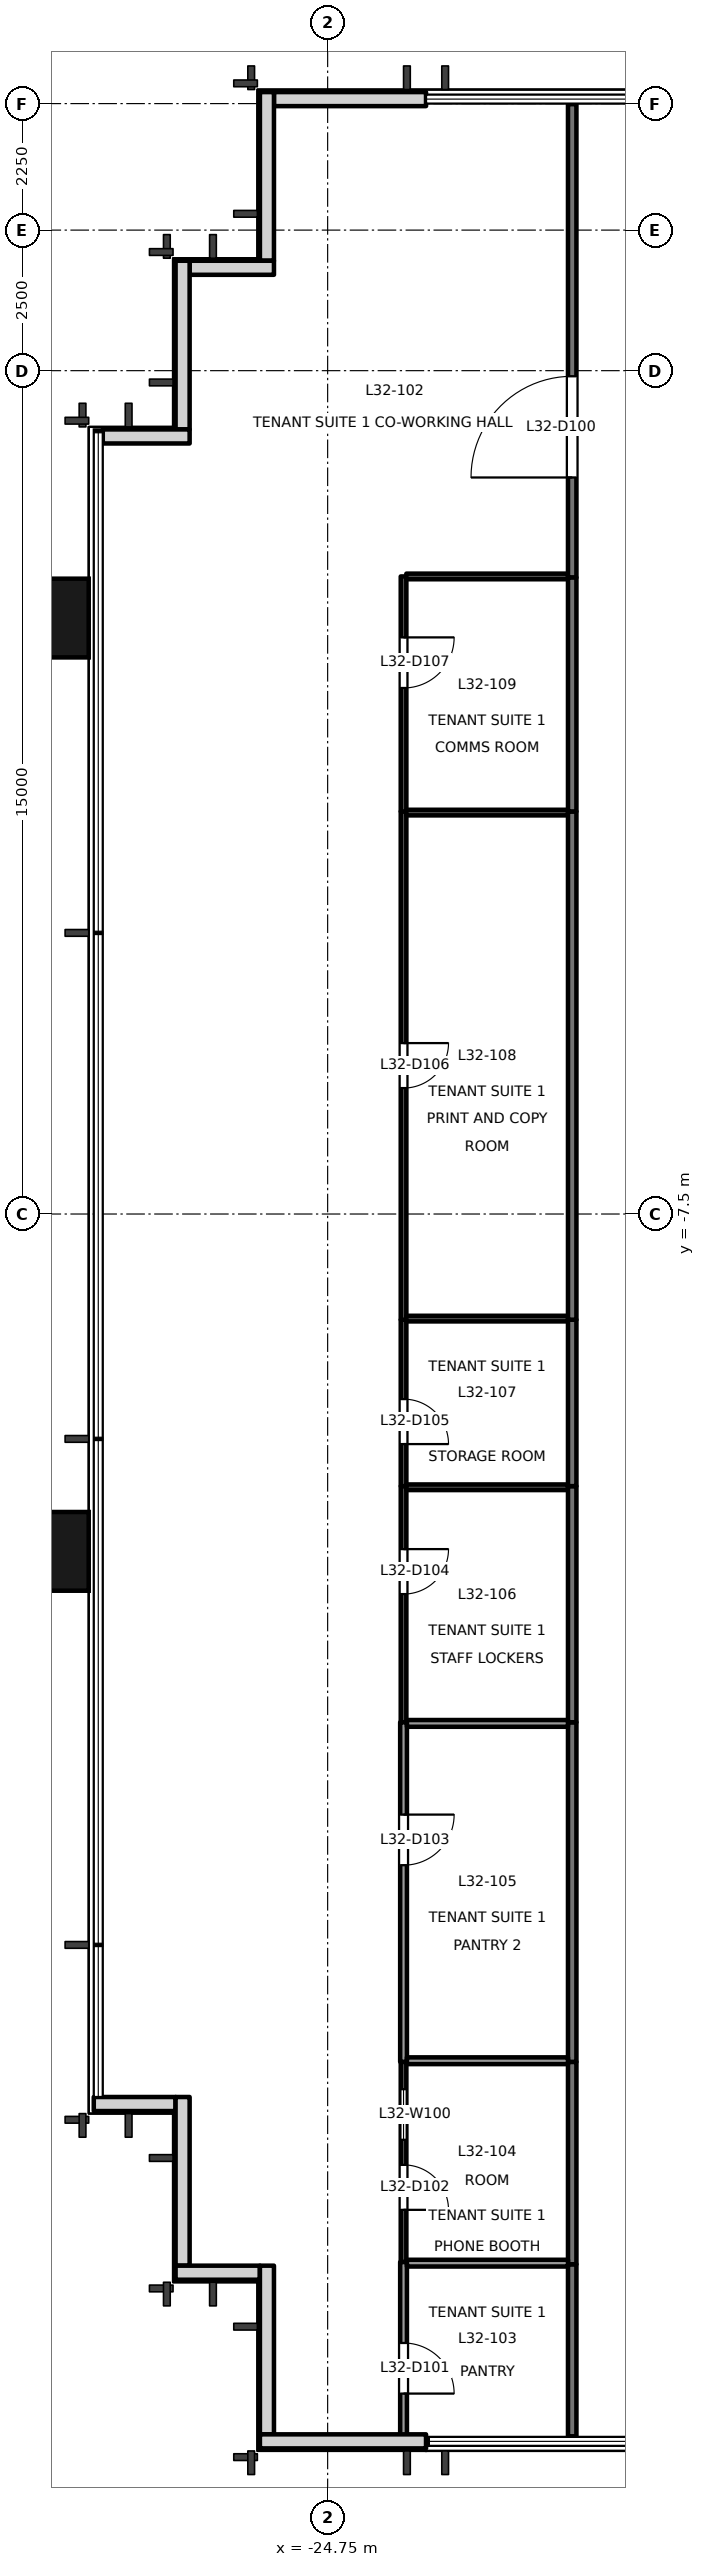
"""IFC4 building model, lengths in metres.
Left out: names, types, materials, properties, quantities, classifications, styles, units other than length and angle.
Written with IfcOpenShell. Run it as: python <this file> out.ifc"""

import sys

from ifc_helpers import new_model, si_unit, direction, frame, frame_2d, origin, origin_2d, place, context, subcontext, project, spatial, rectangle, extrude, element, fill, save


model = new_model("IFC4")
c1 = context("Model", 3, precision=1e-05, world=origin(), true_north=direction((0.0, 1.0)))
c2 = subcontext(c1, "Body", "Model", "MODEL_VIEW")
j1 = project(units=[si_unit("LENGTHUNIT", "METRE"), si_unit("PLANEANGLEUNIT", "RADIAN")], contexts=[c1])
p1 = place(None, origin())
s1 = spatial("IfcSite", under=j1, at=p1, CompositionType="ELEMENT")
p2 = place(p1, origin())
s2 = spatial("IfcBuilding", under=s1, at=p2, CompositionType="ELEMENT")
p3 = place(p2, frame((0.0, 0.0, 142.1)))
s3 = spatial("IfcBuildingStorey", under=s2, at=p3, CompositionType="ELEMENT", Elevation=142.1)
for number, where, z_axis, x_axis in (
    (1, (-29.9, -13.5, -0.2), (0.0, 0.0, 1.0), (0.0, 1.0, 0.0)),
    (2, (-29.9, 3.1, -0.2), (0.0, 0.0, 1.0), (0.0, 1.0, 0.0)),
):
    element("IfcColumn", number, at=place(p3, frame(where, z_axis=z_axis, x_axis=x_axis)), inside=s3, PredefinedType="COLUMN", context=c2, shape_type="SweptSolid", body=[
        extrude(rectangle(XDim=1.4, YDim=1.8, at=origin_2d()), origin(), (0.0, 0.0, 1.0), 4.0),
    ])
p4 = place(p3, frame((-23.0, 12.33, 0.0), z_axis=(0.0, 0.0, 1.0), x_axis=(-1.0, 0.0, 0.0)))
e3 = element("IfcWall", 3, at=p4, inside=s3, PredefinedType="SOLIDWALL", context=c2, shape_type="SweptSolid", body=[
    extrude(rectangle(XDim=2.705, YDim=0.25, at=frame_2d((1.353, 0.0))), origin(), (0.0, 0.0, 1.0), 3.8),
])
p5 = place(p3, frame((-25.83, 12.455, 0.0), z_axis=(0.0, 0.0, 1.0), x_axis=(0.0, -1.0, 0.0)))
e4 = element("IfcWall", 4, at=p5, inside=s3, PredefinedType="SOLIDWALL", context=c2, shape_type="SweptSolid", body=[
    extrude(rectangle(XDim=3.0, YDim=0.25, at=frame_2d((1.5, 0.0))), origin(), (0.0, 0.0, 1.0), 3.8),
])
p6 = place(p3, frame((-25.705, 9.33, 0.0), z_axis=(0.0, 0.0, 1.0), x_axis=(-1.0, 0.0, 0.0)))
e5 = element("IfcWall", 5, at=p6, inside=s3, PredefinedType="SOLIDWALL", context=c2, shape_type="SweptSolid", body=[
    extrude(rectangle(XDim=1.5, YDim=0.25, at=frame_2d((0.75, 0.0))), origin(), (0.0, 0.0, 1.0), 3.8),
])
p7 = place(p3, frame((-27.33, 9.455, 0.0), z_axis=(0.0, 0.0, 1.0), x_axis=(0.0, -1.0, 0.0)))
e6 = element("IfcWall", 6, at=p7, inside=s3, PredefinedType="SOLIDWALL", context=c2, shape_type="SweptSolid", body=[
    extrude(rectangle(XDim=3.0, YDim=0.25, at=frame_2d((1.5, 0.0))), origin(), (0.0, 0.0, 1.0), 3.8),
])
p8 = place(p3, frame((-27.205, 6.33, 0.0), z_axis=(0.0, 0.0, 1.0), x_axis=(-1.0, 0.0, 0.0)))
e7 = element("IfcWall", 7, at=p8, inside=s3, PredefinedType="SOLIDWALL", context=c2, shape_type="SweptSolid", body=[
    extrude(rectangle(XDim=1.545, YDim=0.25, at=frame_2d((0.772, 0.0))), origin(), (0.0, 0.0, 1.0), 3.8),
])
p9 = place(p3, frame((-28.91, -23.33, 0.0), z_axis=(0.0, 0.0, 1.0), x_axis=(1.0, 0.0, 0.0)))
e8 = element("IfcWall", 8, at=p9, inside=s3, PredefinedType="SOLIDWALL", context=c2, shape_type="SweptSolid", body=[
    extrude(rectangle(XDim=1.455, YDim=0.25, at=frame_2d((0.728, 0.0))), origin(), (0.0, 0.0, 1.0), 3.8),
])
p10 = place(p3, frame((-27.33, -23.205, 0.0), z_axis=(0.0, 0.0, 1.0), x_axis=(0.0, -1.0, 0.0)))
e9 = element("IfcWall", 9, at=p10, inside=s3, PredefinedType="SOLIDWALL", context=c2, shape_type="SweptSolid", body=[
    extrude(rectangle(XDim=3.0, YDim=0.25, at=frame_2d((1.5, 0.0))), origin(), (0.0, 0.0, 1.0), 3.8),
])
p11 = place(p3, frame((-27.455, -26.33, 0.0), z_axis=(0.0, 0.0, 1.0), x_axis=(1.0, 0.0, 0.0)))
e10 = element("IfcWall", 10, at=p11, inside=s3, PredefinedType="SOLIDWALL", context=c2, shape_type="SweptSolid", body=[
    extrude(rectangle(XDim=1.5, YDim=0.25, at=frame_2d((0.75, 0.0))), origin(), (0.0, 0.0, 1.0), 3.8),
])
p12 = place(p3, frame((-25.83, -26.205, 0.0), z_axis=(0.0, 0.0, 1.0), x_axis=(0.0, -1.0, 0.0)))
e11 = element("IfcWall", 11, at=p12, inside=s3, PredefinedType="SOLIDWALL", context=c2, shape_type="SweptSolid", body=[
    extrude(rectangle(XDim=3.0, YDim=0.25, at=frame_2d((1.5, 0.0))), origin(), (0.0, 0.0, 1.0), 3.8),
])
p13 = place(p3, frame((-25.955, -29.33, 0.0), z_axis=(0.0, 0.0, 1.0), x_axis=(1.0, 0.0, 0.0)))
e12 = element("IfcWall", 12, at=p13, inside=s3, PredefinedType="SOLIDWALL", context=c2, shape_type="SweptSolid", body=[
    extrude(rectangle(XDim=2.955, YDim=0.25, at=frame_2d((1.478, 0.0))), origin(), (0.0, 0.0, 1.0), 3.8),
])
p14 = place(p3, frame((-20.4, 3.82, 0.0), z_axis=(0.0, 0.0, 1.0), x_axis=(0.0, 1.0, 0.0)))
e13 = element("IfcWall", 13, at=p14, inside=s3, PredefinedType="PARTITIONING", context=c2, shape_type="SweptSolid", body=[
    extrude(rectangle(XDim=8.42, YDim=0.15, at=frame_2d((4.21, 0.0))), origin(), (0.0, 0.0, 1.0), 3.3),
])
p15 = place(p14, frame((1.78, 0.0, 0.0)))
e14 = element("IfcOpeningElement", 14, at=p15, cuts=e13, PredefinedType="OPENING", context=c2, shape_type="SweptSolid", body=[
    extrude(rectangle(XDim=1.8, YDim=2.1, at=frame_2d((0.9, 1.05))), frame((0.0, 0.085, 0.0), z_axis=(0.0, -1.0, 0.0), x_axis=(1.0, 0.0, 0.0)), (0.0, 0.0, 1.0), 0.171),
])
p16 = place(p3, frame((-20.4, -29.24, 0.0), z_axis=(0.0, 0.0, 1.0), x_axis=(0.0, 1.0, 0.0)))
e15 = element("IfcWall", 15, at=p16, inside=s3, PredefinedType="PARTITIONING", context=c2, shape_type="SweptSolid", body=[
    extrude(rectangle(XDim=3.06, YDim=0.15, at=frame_2d((1.53, 0.0))), origin(), (0.0, 0.0, 1.0), 3.8),
])
p17 = place(p3, frame((-20.4, -26.18, 0.0), z_axis=(0.0, 0.0, 1.0), x_axis=(0.0, 1.0, 0.0)))
e16 = element("IfcWall", 16, at=p17, inside=s3, PredefinedType="PARTITIONING", context=c2, shape_type="SweptSolid", body=[
    extrude(rectangle(XDim=3.6, YDim=0.15, at=frame_2d((1.8, 0.0))), origin(), (0.0, 0.0, 1.0), 3.8),
])
p18 = place(p3, frame((-20.4, -22.58, 0.0), z_axis=(0.0, 0.0, 1.0), x_axis=(0.0, 1.0, 0.0)))
e17 = element("IfcWall", 17, at=p18, inside=s3, PredefinedType="PARTITIONING", context=c2, shape_type="SweptSolid", body=[
    extrude(rectangle(XDim=6.04, YDim=0.15, at=frame_2d((3.02, 0.0))), origin(), (0.0, 0.0, 1.0), 3.8),
])
p19 = place(p3, frame((-20.4, -16.54, 0.0), z_axis=(0.0, 0.0, 1.0), x_axis=(0.0, 1.0, 0.0)))
e18 = element("IfcWall", 18, at=p19, inside=s3, PredefinedType="PARTITIONING", context=c2, shape_type="SweptSolid", body=[
    extrude(rectangle(XDim=4.2, YDim=0.15, at=frame_2d((2.1, 0.0))), origin(), (0.0, 0.0, 1.0), 3.8),
])
p20 = place(p3, frame((-20.4, -12.34, 0.0), z_axis=(0.0, 0.0, 1.0), x_axis=(0.0, 1.0, 0.0)))
e19 = element("IfcWall", 19, at=p20, inside=s3, PredefinedType="PARTITIONING", context=c2, shape_type="SweptSolid", body=[
    extrude(rectangle(XDim=2.96, YDim=0.15, at=frame_2d((1.48, 0.0))), origin(), (0.0, 0.0, 1.0), 3.8),
])
p21 = place(p3, frame((-20.4, -9.38, 0.0), z_axis=(0.0, 0.0, 1.0), x_axis=(0.0, 1.0, 0.0)))
e20 = element("IfcWall", 20, at=p21, inside=s3, PredefinedType="PARTITIONING", context=c2, shape_type="SweptSolid", body=[
    extrude(rectangle(XDim=9.04, YDim=0.15, at=frame_2d((4.52, 0.0))), origin(), (0.0, 0.0, 1.0), 3.3),
])
p22 = place(p3, frame((-20.4, -0.34, 0.0), z_axis=(0.0, 0.0, 1.0), x_axis=(0.0, 1.0, 0.0)))
e21 = element("IfcWall", 21, at=p22, inside=s3, PredefinedType="PARTITIONING", context=c2, shape_type="SweptSolid", body=[
    extrude(rectangle(XDim=4.16, YDim=0.15, at=frame_2d((2.08, 0.0))), origin(), (0.0, 0.0, 1.0), 3.3),
])
p23 = place(p3, frame((-23.4, -26.14, 0.0), z_axis=(0.0, 0.0, 1.0), x_axis=(0.0, -1.0, 0.0)))
e22 = element("IfcWall", 22, at=p23, inside=s3, PredefinedType="PARTITIONING", context=c2, shape_type="SweptSolid", body=[
    extrude(rectangle(XDim=3.1, YDim=0.12, at=frame_2d((1.55, 0.0))), origin(), (0.0, 0.0, 1.0), 3.8),
])
p24 = place(p23, frame((1.44, 0.0, 0.0)))
e23 = element("IfcOpeningElement", 23, at=p24, cuts=e22, PredefinedType="OPENING", context=c2, shape_type="SweptSolid", body=[
    extrude(rectangle(XDim=0.9, YDim=2.1, at=frame_2d((0.45, 1.05))), frame((0.0, 0.071, 0.0), z_axis=(0.0, -1.0, 0.0), x_axis=(1.0, 0.0, 0.0)), (0.0, 0.0, 1.0), 0.141),
])
p25 = place(p3, frame((-23.4, -22.58, 0.0), z_axis=(0.0, 0.0, 1.0), x_axis=(0.0, -1.0, 0.0)))
e24 = element("IfcWall", 24, at=p25, inside=s3, PredefinedType="PARTITIONING", context=c2, shape_type="SweptSolid", body=[
    extrude(rectangle(XDim=3.56, YDim=0.1, at=frame_2d((1.78, 0.0))), origin(), (0.0, 0.0, 1.0), 3.8),
])
p26 = place(p25, frame((1.832, 0.0, 0.0)))
e25 = element("IfcOpeningElement", 25, at=p26, cuts=e24, PredefinedType="OPENING", context=c2, shape_type="SweptSolid", body=[
    extrude(rectangle(XDim=0.8, YDim=2.1, at=frame_2d((0.4, 1.05))), frame((0.0, 0.061, 0.0), z_axis=(0.0, -1.0, 0.0), x_axis=(1.0, 0.0, 0.0)), (0.0, 0.0, 1.0), 0.121),
])
p27 = place(p25, frame((0.486, 0.0, 0.9)))
e26 = element("IfcOpeningElement", 26, at=p27, cuts=e24, PredefinedType="OPENING", context=c2, shape_type="SweptSolid", body=[
    extrude(rectangle(XDim=0.9, YDim=1.2, at=frame_2d((0.45, 0.6))), frame((0.0, 0.061, 0.0), z_axis=(0.0, -1.0, 0.0), x_axis=(1.0, 0.0, 0.0)), (0.0, 0.0, 1.0), 0.121),
])
p28 = place(p3, frame((-23.4, -16.54, 0.0), z_axis=(0.0, 0.0, 1.0), x_axis=(0.0, -1.0, 0.0)))
e27 = element("IfcWall", 27, at=p28, inside=s3, PredefinedType="PARTITIONING", context=c2, shape_type="SweptSolid", body=[
    extrude(rectangle(XDim=6.04, YDim=0.12, at=frame_2d((3.02, 0.0))), origin(), (0.0, 0.0, 1.0), 3.8),
])
p29 = place(p28, frame((1.642, 0.0, 0.0)))
e28 = element("IfcOpeningElement", 28, at=p29, cuts=e27, PredefinedType="OPENING", context=c2, shape_type="SweptSolid", body=[
    extrude(rectangle(XDim=0.9, YDim=2.1, at=frame_2d((0.45, 1.05))), frame((0.0, 0.071, 0.0), z_axis=(0.0, -1.0, 0.0), x_axis=(1.0, 0.0, 0.0)), (0.0, 0.0, 1.0), 0.141),
])
p30 = place(p3, frame((-23.4, -12.34, 0.0), z_axis=(0.0, 0.0, 1.0), x_axis=(0.0, -1.0, 0.0)))
e29 = element("IfcWall", 29, at=p30, inside=s3, PredefinedType="PARTITIONING", context=c2, shape_type="SweptSolid", body=[
    extrude(rectangle(XDim=4.2, YDim=0.1, at=frame_2d((2.1, 0.0))), origin(), (0.0, 0.0, 1.0), 3.8),
])
p31 = place(p30, frame((1.12, 0.0, 0.0)))
e30 = element("IfcOpeningElement", 30, at=p31, cuts=e29, PredefinedType="OPENING", context=c2, shape_type="SweptSolid", body=[
    extrude(rectangle(XDim=0.8, YDim=2.1, at=frame_2d((0.4, 1.05))), frame((0.0, 0.061, 0.0), z_axis=(0.0, -1.0, 0.0), x_axis=(1.0, 0.0, 0.0)), (0.0, 0.0, 1.0), 0.121),
])
p32 = place(p3, frame((-23.4, -9.38, 0.0), z_axis=(0.0, 0.0, 1.0), x_axis=(0.0, -1.0, 0.0)))
e31 = element("IfcWall", 31, at=p32, inside=s3, PredefinedType="PARTITIONING", context=c2, shape_type="SweptSolid", body=[
    extrude(rectangle(XDim=2.96, YDim=0.1, at=frame_2d((1.48, 0.0))), origin(), (0.0, 0.0, 1.0), 3.8),
])
p33 = place(p32, frame((1.412, 0.0, 0.0)))
e32 = element("IfcOpeningElement", 32, at=p33, cuts=e31, PredefinedType="OPENING", context=c2, shape_type="SweptSolid", body=[
    extrude(rectangle(XDim=0.8, YDim=2.1, at=frame_2d((0.4, 1.05))), frame((0.0, 0.061, 0.0), z_axis=(0.0, -1.0, 0.0), x_axis=(1.0, 0.0, 0.0)), (0.0, 0.0, 1.0), 0.121),
])
p34 = place(p3, frame((-23.4, -0.34, 0.0), z_axis=(0.0, 0.0, 1.0), x_axis=(0.0, -1.0, 0.0)))
e33 = element("IfcWall", 33, at=p34, inside=s3, PredefinedType="PARTITIONING", context=c2, shape_type="SweptSolid", body=[
    extrude(rectangle(XDim=9.04, YDim=0.1, at=frame_2d((4.52, 0.0))), origin(), (0.0, 0.0, 1.0), 3.3),
])
p35 = place(p34, frame((4.12, 0.0, 0.0)))
e34 = element("IfcOpeningElement", 34, at=p35, cuts=e33, PredefinedType="OPENING", context=c2, shape_type="SweptSolid", body=[
    extrude(rectangle(XDim=0.8, YDim=2.1, at=frame_2d((0.4, 1.05))), frame((0.0, 0.061, 0.0), z_axis=(0.0, -1.0, 0.0), x_axis=(1.0, 0.0, 0.0)), (0.0, 0.0, 1.0), 0.121),
])
p36 = place(p3, frame((-23.4, 3.84, 0.0), z_axis=(0.0, 0.0, 1.0), x_axis=(0.0, -1.0, 0.0)))
e35 = element("IfcWall", 35, at=p36, inside=s3, PredefinedType="PARTITIONING", context=c2, shape_type="SweptSolid", body=[
    extrude(rectangle(XDim=4.18, YDim=0.1, at=frame_2d((2.09, 0.0))), origin(), (0.0, 0.0, 1.0), 3.3),
])
p37 = place(p36, frame((1.084, 0.0, 0.0)))
e36 = element("IfcOpeningElement", 36, at=p37, cuts=e35, PredefinedType="OPENING", context=c2, shape_type="SweptSolid", body=[
    extrude(rectangle(XDim=0.9, YDim=2.1, at=frame_2d((0.45, 1.05))), frame((0.0, 0.061, 0.0), z_axis=(0.0, -1.0, 0.0), x_axis=(1.0, 0.0, 0.0)), (0.0, 0.0, 1.0), 0.121),
])
p38 = place(p3, frame((-20.475, 3.84, 0.0), z_axis=(0.0, 0.0, 1.0), x_axis=(-1.0, 0.0, 0.0)))
e37 = element("IfcWall", 37, at=p38, inside=s3, PredefinedType="PARTITIONING", context=c2, shape_type="SweptSolid", body=[
    extrude(rectangle(XDim=2.875, YDim=0.1, at=frame_2d((1.438, 0.0))), origin(), (0.0, 0.0, 1.0), 3.8),
])
for number, where, z_axis, x_axis in (
    (38, (-23.34, -26.16, 0.0), (0.0, 0.0, 1.0), (1.0, 0.0, 0.0)),
    (39, (-23.34, -22.56, 0.0), (0.0, 0.0, 1.0), (1.0, 0.0, 0.0)),
    (40, (-23.34, -16.56, 0.0), (0.0, 0.0, 1.0), (1.0, 0.0, 0.0)),
):
    element("IfcWall", number, at=place(p3, frame(where, z_axis=z_axis, x_axis=x_axis)), inside=s3, PredefinedType="PARTITIONING", context=c2, shape_type="SweptSolid", body=[
        extrude(rectangle(XDim=2.865, YDim=0.12, at=frame_2d((1.433, 0.0))), origin(), (0.0, 0.0, 1.0), 3.8),
    ])
for number, where, z_axis, x_axis in (
    (41, (-23.35, -12.36, 0.0), (0.0, 0.0, 1.0), (1.0, 0.0, 0.0)),
    (42, (-23.35, -9.36, 0.0), (0.0, 0.0, 1.0), (1.0, 0.0, 0.0)),
    (43, (-23.35, -0.36, 0.0), (0.0, 0.0, 1.0), (1.0, 0.0, 0.0)),
):
    element("IfcWall", number, at=place(p3, frame(where, z_axis=z_axis, x_axis=x_axis)), inside=s3, PredefinedType="PARTITIONING", context=c2, shape_type="SweptSolid", body=[
        extrude(rectangle(XDim=2.875, YDim=0.1, at=frame_2d((1.438, 0.0))), origin(), (0.0, 0.0, 1.0), 3.8),
    ])
p39 = place(p15, origin())
e44 = element("IfcDoor", 44, at=p39, inside=s3, OperationType="DOUBLE_DOOR_SINGLE_SWING", PredefinedType="DOOR", context=c2, shape_type="SweptSolid", body=[
    extrude(rectangle(XDim=1.8, YDim=2.1, at=frame_2d((0.9, 1.05))), frame((0.0, 0.025, 0.0), z_axis=(0.0, -1.0, 0.0), x_axis=(1.0, 0.0, 0.0)), (0.0, 0.0, 1.0), 0.05),
])
fill(e14, e44)
p40 = place(p24, origin())
e45 = element("IfcDoor", 45, at=p40, inside=s3, OperationType="SINGLE_SWING_RIGHT", PredefinedType="DOOR", context=c2, shape_type="SweptSolid", body=[
    extrude(rectangle(XDim=0.9, YDim=2.1, at=frame_2d((0.45, 1.05))), frame((0.0, 0.025, 0.0), z_axis=(0.0, -1.0, 0.0), x_axis=(1.0, 0.0, 0.0)), (0.0, 0.0, 1.0), 0.05),
])
fill(e23, e45)
p41 = place(p26, origin())
e46 = element("IfcDoor", 46, at=p41, inside=s3, OperationType="SINGLE_SWING_RIGHT", PredefinedType="DOOR", context=c2, shape_type="SweptSolid", body=[
    extrude(rectangle(XDim=0.8, YDim=2.1, at=frame_2d((0.4, 1.05))), frame((0.0, 0.025, 0.0), z_axis=(0.0, -1.0, 0.0), x_axis=(1.0, 0.0, 0.0)), (0.0, 0.0, 1.0), 0.05),
])
fill(e25, e46)
p42 = place(p29, origin())
e47 = element("IfcDoor", 47, at=p42, inside=s3, OperationType="SINGLE_SWING_LEFT", PredefinedType="DOOR", context=c2, shape_type="SweptSolid", body=[
    extrude(rectangle(XDim=0.9, YDim=2.1, at=frame_2d((0.45, 1.05))), frame((0.0, 0.025, 0.0), z_axis=(0.0, -1.0, 0.0), x_axis=(1.0, 0.0, 0.0)), (0.0, 0.0, 1.0), 0.05),
])
fill(e28, e47)
p43 = place(p31, origin())
e48 = element("IfcDoor", 48, at=p43, inside=s3, OperationType="SINGLE_SWING_LEFT", PredefinedType="DOOR", context=c2, shape_type="SweptSolid", body=[
    extrude(rectangle(XDim=0.8, YDim=2.1, at=frame_2d((0.4, 1.05))), frame((0.0, 0.025, 0.0), z_axis=(0.0, -1.0, 0.0), x_axis=(1.0, 0.0, 0.0)), (0.0, 0.0, 1.0), 0.05),
])
fill(e30, e48)
p44 = place(p33, origin())
e49 = element("IfcDoor", 49, at=p44, inside=s3, OperationType="SINGLE_SWING_RIGHT", PredefinedType="DOOR", context=c2, shape_type="SweptSolid", body=[
    extrude(rectangle(XDim=0.8, YDim=2.1, at=frame_2d((0.4, 1.05))), frame((0.0, 0.025, 0.0), z_axis=(0.0, -1.0, 0.0), x_axis=(1.0, 0.0, 0.0)), (0.0, 0.0, 1.0), 0.05),
])
fill(e32, e49)
p45 = place(p35, origin())
e50 = element("IfcDoor", 50, at=p45, inside=s3, OperationType="SINGLE_SWING_LEFT", PredefinedType="DOOR", context=c2, shape_type="SweptSolid", body=[
    extrude(rectangle(XDim=0.8, YDim=2.1, at=frame_2d((0.4, 1.05))), frame((0.0, 0.025, 0.0), z_axis=(0.0, -1.0, 0.0), x_axis=(1.0, 0.0, 0.0)), (0.0, 0.0, 1.0), 0.05),
])
fill(e34, e50)
p46 = place(p37, origin())
e51 = element("IfcDoor", 51, at=p46, inside=s3, OperationType="SINGLE_SWING_LEFT", PredefinedType="DOOR", context=c2, shape_type="SweptSolid", body=[
    extrude(rectangle(XDim=0.9, YDim=2.1, at=frame_2d((0.45, 1.05))), frame((0.0, 0.025, 0.0), z_axis=(0.0, -1.0, 0.0), x_axis=(1.0, 0.0, 0.0)), (0.0, 0.0, 1.0), 0.05),
])
fill(e36, e51)
p47 = place(p27, origin())
e52 = element("IfcWindow", 52, at=p47, inside=s3, PartitioningType="SINGLE_PANEL", PredefinedType="WINDOW", context=c2, shape_type="SweptSolid", body=[
    extrude(rectangle(XDim=0.9, YDim=1.2, at=frame_2d((0.45, 0.6))), frame((0.0, 0.03, 0.0), z_axis=(0.0, -1.0, 0.0), x_axis=(1.0, 0.0, 0.0)), (0.0, 0.0, 1.0), 0.06),
])
fill(e26, e52)
save(model, sys.argv[1])
